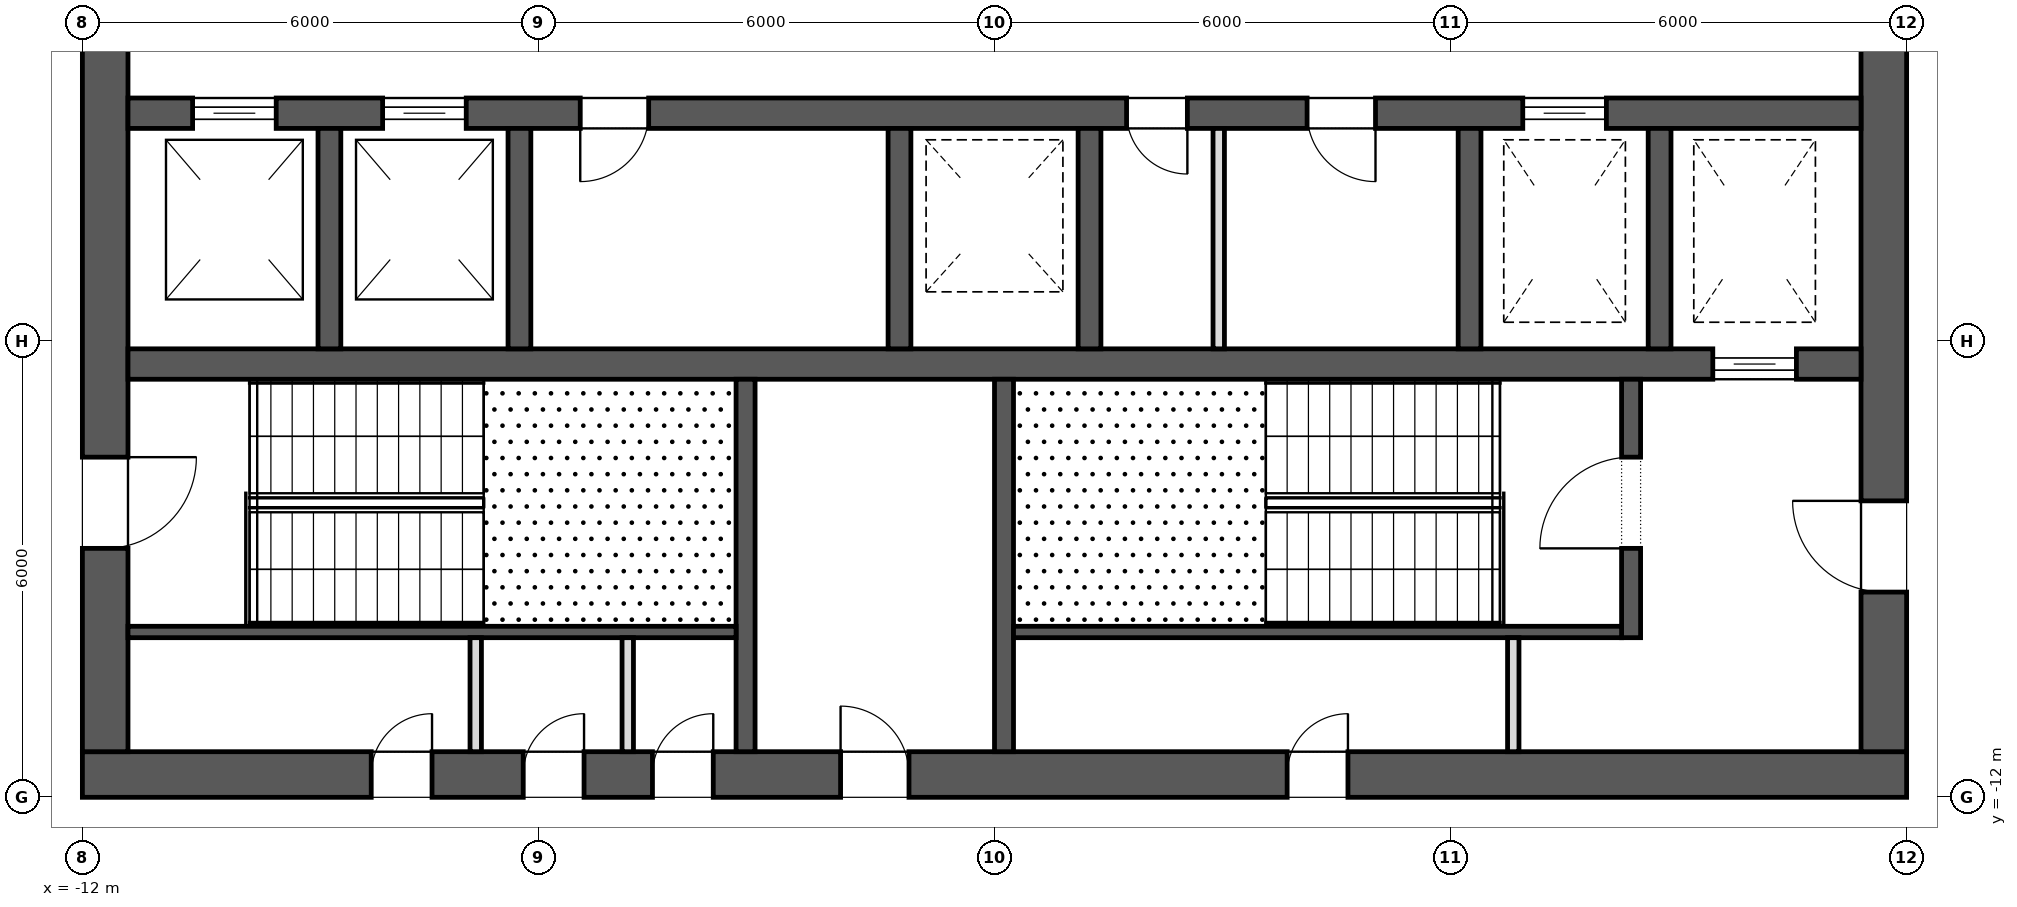
"""IFC4 building model, lengths in metres.
Left out: names, types, materials, properties, quantities, classifications, styles, units other than length and angle.
Written with IfcOpenShell. Run it as: python <this file> out.ifc"""

import sys

from ifc_helpers import new_model, si_unit, direction, frame, frame_2d, origin, place, context, subcontext, project, spatial, rectangle, extrude, element, fill, save


model = new_model("IFC4")
c1 = context("Model", 3, precision=1e-05, world=origin(), true_north=direction((0.0, 1.0)))
c2 = subcontext(c1, "Body", "Model", "MODEL_VIEW")
j1 = project(units=[si_unit("LENGTHUNIT", "METRE"), si_unit("PLANEANGLEUNIT", "RADIAN")], contexts=[c1])
p1 = place(None, origin())
s1 = spatial("IfcSite", under=j1, at=p1, CompositionType="ELEMENT")
p2 = place(p1, origin())
s2 = spatial("IfcBuilding", under=s1, at=p2, CompositionType="ELEMENT")
p3 = place(p2, frame((0.0, 0.0, 256.3)))
s3 = spatial("IfcBuildingStorey", under=s2, at=p3, CompositionType="ELEMENT", Elevation=256.3)
p4 = place(p3, frame((-12.0, -11.7, 0.0), z_axis=(0.0, 0.0, 1.0), x_axis=(1.0, 0.0, 0.0)))
e1 = element("IfcWall", 1, at=p4, inside=s3, PredefinedType="SHEAR", context=c2, shape_type="SweptSolid", body=[
    extrude(rectangle(XDim=24.0, YDim=0.6, at=frame_2d((12.0, 0.0))), origin(), (0.0, 0.0, 1.0), 4.0),
])
p5 = place(p4, frame((9.975, 0.0, 0.0)))
e2 = element("IfcOpeningElement", 2, at=p5, cuts=e1, PredefinedType="OPENING", context=c2, shape_type="SweptSolid", body=[
    extrude(rectangle(XDim=0.9, YDim=2.1, at=frame_2d((0.45, 1.05))), frame((0.0, 0.312, 0.0), z_axis=(0.0, -1.0, 0.0), x_axis=(1.0, 0.0, 0.0)), (0.0, 0.0, 1.0), 0.624),
])
p6 = place(p4, frame((3.8, 0.0, 0.0)))
e3 = element("IfcOpeningElement", 3, at=p6, cuts=e1, PredefinedType="OPENING", context=c2, shape_type="SweptSolid", body=[
    extrude(rectangle(XDim=0.8, YDim=2.1, at=frame_2d((0.4, 1.05))), frame((0.0, 0.312, 0.0), z_axis=(0.0, -1.0, 0.0), x_axis=(1.0, 0.0, 0.0)), (0.0, 0.0, 1.0), 0.624),
])
p7 = place(p4, frame((5.8, 0.0, 0.0)))
e4 = element("IfcOpeningElement", 4, at=p7, cuts=e1, PredefinedType="OPENING", context=c2, shape_type="SweptSolid", body=[
    extrude(rectangle(XDim=0.8, YDim=2.1, at=frame_2d((0.4, 1.05))), frame((0.0, 0.312, 0.0), z_axis=(0.0, -1.0, 0.0), x_axis=(1.0, 0.0, 0.0)), (0.0, 0.0, 1.0), 0.624),
])
p8 = place(p4, frame((7.5, 0.0, 0.0)))
e5 = element("IfcOpeningElement", 5, at=p8, cuts=e1, PredefinedType="OPENING", context=c2, shape_type="SweptSolid", body=[
    extrude(rectangle(XDim=0.8, YDim=2.1, at=frame_2d((0.4, 1.05))), frame((0.0, 0.312, 0.0), z_axis=(0.0, -1.0, 0.0), x_axis=(1.0, 0.0, 0.0)), (0.0, 0.0, 1.0), 0.624),
])
p9 = place(p4, frame((15.85, 0.0, 0.0)))
e6 = element("IfcOpeningElement", 6, at=p9, cuts=e1, PredefinedType="OPENING", context=c2, shape_type="SweptSolid", body=[
    extrude(rectangle(XDim=0.8, YDim=2.1, at=frame_2d((0.4, 1.05))), frame((0.0, 0.312, 0.0), z_axis=(0.0, -1.0, 0.0), x_axis=(1.0, 0.0, 0.0)), (0.0, 0.0, 1.0), 0.624),
])
p10 = place(p3, frame((11.7, -11.4, 0.0), z_axis=(0.0, 0.0, 1.0), x_axis=(0.0, 1.0, 0.0)))
e7 = element("IfcWall", 7, at=p10, inside=s3, PredefinedType="SHEAR", context=c2, shape_type="SweptSolid", body=[
    extrude(rectangle(XDim=22.8, YDim=0.6, at=frame_2d((11.4, 0.0))), origin(), (0.0, 0.0, 1.0), 4.0),
])
p11 = place(p10, frame((10.2, 0.0, 0.0)))
e8 = element("IfcOpeningElement", 8, at=p11, cuts=e7, PredefinedType="OPENING", context=c2, shape_type="SweptSolid", body=[
    extrude(rectangle(XDim=2.4, YDim=2.1, at=frame_2d((1.2, 1.05))), frame((0.0, 0.312, 0.0), z_axis=(0.0, -1.0, 0.0), x_axis=(1.0, 0.0, 0.0)), (0.0, 0.0, 1.0), 0.624),
])
p12 = place(p10, frame((19.5, 0.0, 0.0)))
e9 = element("IfcOpeningElement", 9, at=p12, cuts=e7, PredefinedType="OPENING", context=c2, shape_type="SweptSolid", body=[
    extrude(rectangle(XDim=1.2, YDim=2.1, at=frame_2d((0.6, 1.05))), frame((0.0, 0.312, 0.0), z_axis=(0.0, -1.0, 0.0), x_axis=(1.0, 0.0, 0.0)), (0.0, 0.0, 1.0), 0.624),
])
p13 = place(p10, frame((2.1, 0.0, 0.0)))
e10 = element("IfcOpeningElement", 10, at=p13, cuts=e7, PredefinedType="OPENING", context=c2, shape_type="SweptSolid", body=[
    extrude(rectangle(XDim=1.2, YDim=2.1, at=frame_2d((0.6, 1.05))), frame((0.0, 0.312, 0.0), z_axis=(0.0, -1.0, 0.0), x_axis=(1.0, 0.0, 0.0)), (0.0, 0.0, 1.0), 0.624),
])
p14 = place(p3, frame((-11.7, -11.4, 0.0), z_axis=(0.0, 0.0, 1.0), x_axis=(0.0, 1.0, 0.0)))
e11 = element("IfcWall", 11, at=p14, inside=s3, PredefinedType="SHEAR", context=c2, shape_type="SweptSolid", body=[
    extrude(rectangle(XDim=22.8, YDim=0.6, at=frame_2d((11.4, 0.0))), origin(), (0.0, 0.0, 1.0), 4.0),
])
p15 = place(p14, frame((10.2, 0.0, 0.0)))
e12 = element("IfcOpeningElement", 12, at=p15, cuts=e11, PredefinedType="OPENING", context=c2, shape_type="SweptSolid", body=[
    extrude(rectangle(XDim=2.4, YDim=2.1, at=frame_2d((1.2, 1.05))), frame((0.0, 0.312, 0.0), z_axis=(0.0, -1.0, 0.0), x_axis=(1.0, 0.0, 0.0)), (0.0, 0.0, 1.0), 0.624),
])
p16 = place(p14, frame((18.925, 0.0, 0.0)))
e13 = element("IfcOpeningElement", 13, at=p16, cuts=e11, PredefinedType="OPENING", context=c2, shape_type="SweptSolid", body=[
    extrude(rectangle(XDim=1.2, YDim=2.1, at=frame_2d((0.6, 1.05))), frame((0.0, 0.312, 0.0), z_axis=(0.0, -1.0, 0.0), x_axis=(1.0, 0.0, 0.0)), (0.0, 0.0, 1.0), 0.624),
])
p17 = place(p14, frame((2.675, 0.0, 0.0)))
e14 = element("IfcOpeningElement", 14, at=p17, cuts=e11, PredefinedType="OPENING", context=c2, shape_type="SweptSolid", body=[
    extrude(rectangle(XDim=1.2, YDim=2.1, at=frame_2d((0.6, 1.05))), frame((0.0, 0.312, 0.0), z_axis=(0.0, -1.0, 0.0), x_axis=(1.0, 0.0, 0.0)), (0.0, 0.0, 1.0), 0.624),
])
p18 = place(p3, frame((-11.4, -3.0, 0.0), z_axis=(0.0, 0.0, 1.0), x_axis=(1.0, 0.0, 0.0)))
e15 = element("IfcWall", 15, at=p18, inside=s3, PredefinedType="SHEAR", context=c2, shape_type="SweptSolid", body=[
    extrude(rectangle(XDim=22.8, YDim=0.4, at=frame_2d((11.4, 0.0))), origin(), (0.0, 0.0, 1.0), 4.0),
])
p19 = place(p18, frame((0.85, 0.0, 0.0)))
e16 = element("IfcOpeningElement", 16, at=p19, cuts=e15, PredefinedType="OPENING", context=c2, shape_type="SweptSolid", body=[
    extrude(rectangle(XDim=1.1, YDim=2.1, at=frame_2d((0.55, 1.05))), frame((0.0, 0.212, 0.0), z_axis=(0.0, -1.0, 0.0), x_axis=(1.0, 0.0, 0.0)), (0.0, 0.0, 1.0), 0.424),
])
p20 = place(p18, frame((3.35, 0.0, 0.0)))
e17 = element("IfcOpeningElement", 17, at=p20, cuts=e15, PredefinedType="OPENING", context=c2, shape_type="SweptSolid", body=[
    extrude(rectangle(XDim=1.1, YDim=2.1, at=frame_2d((0.55, 1.05))), frame((0.0, 0.212, 0.0), z_axis=(0.0, -1.0, 0.0), x_axis=(1.0, 0.0, 0.0)), (0.0, 0.0, 1.0), 0.424),
])
p21 = place(p18, frame((18.35, 0.0, 0.0)))
e18 = element("IfcOpeningElement", 18, at=p21, cuts=e15, PredefinedType="OPENING", context=c2, shape_type="SweptSolid", body=[
    extrude(rectangle(XDim=1.1, YDim=2.1, at=frame_2d((0.55, 1.05))), frame((0.0, 0.212, 0.0), z_axis=(0.0, -1.0, 0.0), x_axis=(1.0, 0.0, 0.0)), (0.0, 0.0, 1.0), 0.424),
])
p22 = place(p18, frame((13.137, 0.0, 0.0)))
e19 = element("IfcOpeningElement", 19, at=p22, cuts=e15, PredefinedType="OPENING", context=c2, shape_type="SweptSolid", body=[
    extrude(rectangle(XDim=0.8, YDim=2.1, at=frame_2d((0.4, 1.05))), frame((0.0, 0.212, 0.0), z_axis=(0.0, -1.0, 0.0), x_axis=(1.0, 0.0, 0.0)), (0.0, 0.0, 1.0), 0.424),
])
p23 = place(p18, frame((15.512, 0.0, 0.0)))
e20 = element("IfcOpeningElement", 20, at=p23, cuts=e15, PredefinedType="OPENING", context=c2, shape_type="SweptSolid", body=[
    extrude(rectangle(XDim=0.9, YDim=2.1, at=frame_2d((0.45, 1.05))), frame((0.0, 0.212, 0.0), z_axis=(0.0, -1.0, 0.0), x_axis=(1.0, 0.0, 0.0)), (0.0, 0.0, 1.0), 0.424),
])
p24 = place(p18, frame((5.95, 0.0, 0.0)))
e21 = element("IfcOpeningElement", 21, at=p24, cuts=e15, PredefinedType="OPENING", context=c2, shape_type="SweptSolid", body=[
    extrude(rectangle(XDim=0.9, YDim=2.1, at=frame_2d((0.45, 1.05))), frame((0.0, 0.212, 0.0), z_axis=(0.0, -1.0, 0.0), x_axis=(1.0, 0.0, 0.0)), (0.0, 0.0, 1.0), 0.424),
])
p25 = place(p3, frame((-11.4, -6.3, 0.0), z_axis=(0.0, 0.0, 1.0), x_axis=(1.0, 0.0, 0.0)))
e22 = element("IfcWall", 22, at=p25, inside=s3, PredefinedType="SHEAR", context=c2, shape_type="SweptSolid", body=[
    extrude(rectangle(XDim=22.8, YDim=0.4, at=frame_2d((11.4, 0.0))), origin(), (0.0, 0.0, 1.0), 4.0),
])
p26 = place(p25, frame((20.85, 0.0, 0.0)))
e23 = element("IfcOpeningElement", 23, at=p26, cuts=e22, PredefinedType="OPENING", context=c2, shape_type="SweptSolid", body=[
    extrude(rectangle(XDim=1.1, YDim=2.1, at=frame_2d((0.55, 1.05))), frame((0.0, 0.212, 0.0), z_axis=(0.0, -1.0, 0.0), x_axis=(1.0, 0.0, 0.0)), (0.0, 0.0, 1.0), 0.424),
])
for number, where, z_axis, x_axis in (
    (24, (-8.75, -6.1, 0.0), (0.0, 0.0, 1.0), (0.0, 1.0, 0.0)),
    (25, (-6.25, -6.1, 0.0), (0.0, 0.0, 1.0), (0.0, 1.0, 0.0)),
    (26, (-1.25, -6.1, 0.0), (0.0, 0.0, 1.0), (0.0, 1.0, 0.0)),
    (27, (1.25, -6.1, 0.0), (0.0, 0.0, 1.0), (0.0, 1.0, 0.0)),
    (28, (6.25, -6.1, 0.0), (0.0, 0.0, 1.0), (0.0, 1.0, 0.0)),
    (29, (8.75, -6.1, 0.0), (0.0, 0.0, 1.0), (0.0, 1.0, 0.0)),
):
    element("IfcWall", number, at=place(p3, frame(where, z_axis=z_axis, x_axis=x_axis)), inside=s3, PredefinedType="SHEAR", context=c2, shape_type="SweptSolid", body=[
        extrude(rectangle(XDim=2.9, YDim=0.3, at=frame_2d((1.45, 0.0))), origin(), (0.0, 0.0, 1.0), 4.0),
    ])
for number, where, z_axis, x_axis in (
    (30, (-3.275, -11.4, 0.0), (0.0, 0.0, 1.0), (0.0, 1.0, 0.0)),
    (31, (0.125, -11.4, 0.0), (0.0, 0.0, 1.0), (0.0, 1.0, 0.0)),
):
    element("IfcWall", number, at=place(p3, frame(where, z_axis=z_axis, x_axis=x_axis)), inside=s3, PredefinedType="SHEAR", context=c2, shape_type="SweptSolid", body=[
        extrude(rectangle(XDim=4.9, YDim=0.25, at=frame_2d((2.45, 0.0))), origin(), (0.0, 0.0, 1.0), 3.7),
    ])
p27 = place(p3, frame((8.375, -9.9, 0.0), z_axis=(0.0, 0.0, 1.0), x_axis=(0.0, 1.0, 0.0)))
e32 = element("IfcWall", 32, at=p27, inside=s3, PredefinedType="SHEAR", context=c2, shape_type="SweptSolid", body=[
    extrude(rectangle(XDim=3.4, YDim=0.25, at=frame_2d((1.7, 0.0))), origin(), (0.0, 0.0, 1.0), 3.7),
])
p28 = place(p27, frame((1.175, 0.0, 0.0)))
e33 = element("IfcOpeningElement", 33, at=p28, cuts=e32, PredefinedType="OPENING", context=c2, shape_type="SweptSolid", body=[
    extrude(rectangle(XDim=1.2, YDim=2.1, at=frame_2d((0.6, 1.05))), frame((0.0, 0.137, 0.0), z_axis=(0.0, -1.0, 0.0), x_axis=(1.0, 0.0, 0.0)), (0.0, 0.0, 1.0), 0.274),
])
for number, where, z_axis, x_axis in (
    (34, (-11.4, -9.825, 0.0), (0.0, 0.0, 1.0), (1.0, 0.0, 0.0)),
    (35, (0.25, -9.825, 0.0), (0.0, 0.0, 1.0), (1.0, 0.0, 0.0)),
):
    element("IfcWall", number, at=place(p3, frame(where, z_axis=z_axis, x_axis=x_axis)), inside=s3, PredefinedType="SHEAR", context=c2, shape_type="SweptSolid", body=[
        extrude(rectangle(XDim=8.0, YDim=0.15, at=frame_2d((4.0, 0.0))), origin(), (0.0, 0.0, 1.0), 3.7),
    ])
for number, where, z_axis, x_axis in (
    (36, (-6.825, -11.4, 0.0), (0.0, 0.0, 1.0), (0.0, 1.0, 0.0)),
    (37, (-4.825, -11.4, 0.0), (0.0, 0.0, 1.0), (0.0, 1.0, 0.0)),
    (38, (6.825, -11.4, 0.0), (0.0, 0.0, 1.0), (0.0, 1.0, 0.0)),
):
    element("IfcWall", number, at=place(p3, frame(where, z_axis=z_axis, x_axis=x_axis)), inside=s3, PredefinedType="PARTITIONING", context=c2, shape_type="SweptSolid", body=[
        extrude(rectangle(XDim=1.5, YDim=0.15, at=frame_2d((0.75, 0.0))), origin(), (0.0, 0.0, 1.0), 3.7),
    ])
p29 = place(p3, frame((2.95, -6.1, 0.0), z_axis=(0.0, 0.0, 1.0), x_axis=(0.0, 1.0, 0.0)))
e39 = element("IfcWall", 39, at=p29, inside=s3, PredefinedType="PARTITIONING", context=c2, shape_type="SweptSolid", body=[
    extrude(rectangle(XDim=2.9, YDim=0.15, at=frame_2d((1.45, 0.0))), origin(), (0.0, 0.0, 1.0), 3.7),
])
p30 = place(p26, origin())
e40 = element("IfcDoor", 40, at=p30, inside=s3, OperationType="SLIDING_TO_LEFT", PredefinedType="DOOR", context=c2, shape_type="SweptSolid", body=[
    extrude(rectangle(XDim=1.1, YDim=2.1, at=frame_2d((0.55, 1.05))), frame((0.0, 0.025, 0.0), z_axis=(0.0, -1.0, 0.0), x_axis=(1.0, 0.0, 0.0)), (0.0, 0.0, 1.0), 0.05),
])
fill(e23, e40)
p31 = place(p19, origin())
e41 = element("IfcDoor", 41, at=p31, inside=s3, OperationType="SLIDING_TO_LEFT", PredefinedType="DOOR", context=c2, shape_type="SweptSolid", body=[
    extrude(rectangle(XDim=1.1, YDim=2.1, at=frame_2d((0.55, 1.05))), frame((0.0, 0.025, 0.0), z_axis=(0.0, -1.0, 0.0), x_axis=(1.0, 0.0, 0.0)), (0.0, 0.0, 1.0), 0.05),
])
fill(e16, e41)
p32 = place(p20, origin())
e42 = element("IfcDoor", 42, at=p32, inside=s3, OperationType="SLIDING_TO_LEFT", PredefinedType="DOOR", context=c2, shape_type="SweptSolid", body=[
    extrude(rectangle(XDim=1.1, YDim=2.1, at=frame_2d((0.55, 1.05))), frame((0.0, 0.025, 0.0), z_axis=(0.0, -1.0, 0.0), x_axis=(1.0, 0.0, 0.0)), (0.0, 0.0, 1.0), 0.05),
])
fill(e17, e42)
p33 = place(p21, origin())
e43 = element("IfcDoor", 43, at=p33, inside=s3, OperationType="SLIDING_TO_LEFT", PredefinedType="DOOR", context=c2, shape_type="SweptSolid", body=[
    extrude(rectangle(XDim=1.1, YDim=2.1, at=frame_2d((0.55, 1.05))), frame((0.0, 0.025, 0.0), z_axis=(0.0, -1.0, 0.0), x_axis=(1.0, 0.0, 0.0)), (0.0, 0.0, 1.0), 0.05),
])
fill(e18, e43)
p34 = place(p17, frame((1.2, 0.0, 0.0), z_axis=(0.0, 0.0, 1.0), x_axis=(-1.0, 0.0, 0.0)))
e44 = element("IfcDoor", 44, at=p34, inside=s3, OperationType="SINGLE_SWING_RIGHT", PredefinedType="DOOR", context=c2, shape_type="SweptSolid", body=[
    extrude(rectangle(XDim=1.2, YDim=2.1, at=frame_2d((0.6, 1.05))), frame((0.0, 0.025, 0.0), z_axis=(0.0, -1.0, 0.0), x_axis=(1.0, 0.0, 0.0)), (0.0, 0.0, 1.0), 0.05),
])
fill(e14, e44)
p35 = place(p28, origin())
e45 = element("IfcDoor", 45, at=p35, inside=s3, OperationType="SINGLE_SWING_RIGHT", PredefinedType="DOOR", context=c2, shape_type="SweptSolid", body=[
    extrude(rectangle(XDim=1.2, YDim=2.1, at=frame_2d((0.6, 1.05))), frame((0.0, 0.025, 0.0), z_axis=(0.0, -1.0, 0.0), x_axis=(1.0, 0.0, 0.0)), (0.0, 0.0, 1.0), 0.05),
])
fill(e33, e45)
p36 = place(p13, origin())
e46 = element("IfcDoor", 46, at=p36, inside=s3, OperationType="SINGLE_SWING_LEFT", PredefinedType="DOOR", context=c2, shape_type="SweptSolid", body=[
    extrude(rectangle(XDim=1.2, YDim=2.1, at=frame_2d((0.6, 1.05))), frame((0.0, 0.025, 0.0), z_axis=(0.0, -1.0, 0.0), x_axis=(1.0, 0.0, 0.0)), (0.0, 0.0, 1.0), 0.05),
])
fill(e10, e46)
p37 = place(p5, origin())
e47 = element("IfcDoor", 47, at=p37, inside=s3, OperationType="SINGLE_SWING_RIGHT", PredefinedType="DOOR", context=c2, shape_type="SweptSolid", body=[
    extrude(rectangle(XDim=0.9, YDim=2.1, at=frame_2d((0.45, 1.05))), frame((0.0, 0.025, 0.0), z_axis=(0.0, -1.0, 0.0), x_axis=(1.0, 0.0, 0.0)), (0.0, 0.0, 1.0), 0.05),
])
fill(e2, e47)
p38 = place(p6, origin())
e48 = element("IfcDoor", 48, at=p38, inside=s3, OperationType="SINGLE_SWING_LEFT", PredefinedType="DOOR", context=c2, shape_type="SweptSolid", body=[
    extrude(rectangle(XDim=0.8, YDim=2.1, at=frame_2d((0.4, 1.05))), frame((0.0, 0.025, 0.0), z_axis=(0.0, -1.0, 0.0), x_axis=(1.0, 0.0, 0.0)), (0.0, 0.0, 1.0), 0.05),
])
fill(e3, e48)
p39 = place(p7, origin())
e49 = element("IfcDoor", 49, at=p39, inside=s3, OperationType="SINGLE_SWING_LEFT", PredefinedType="DOOR", context=c2, shape_type="SweptSolid", body=[
    extrude(rectangle(XDim=0.8, YDim=2.1, at=frame_2d((0.4, 1.05))), frame((0.0, 0.025, 0.0), z_axis=(0.0, -1.0, 0.0), x_axis=(1.0, 0.0, 0.0)), (0.0, 0.0, 1.0), 0.05),
])
fill(e4, e49)
p40 = place(p8, origin())
e50 = element("IfcDoor", 50, at=p40, inside=s3, OperationType="SINGLE_SWING_LEFT", PredefinedType="DOOR", context=c2, shape_type="SweptSolid", body=[
    extrude(rectangle(XDim=0.8, YDim=2.1, at=frame_2d((0.4, 1.05))), frame((0.0, 0.025, 0.0), z_axis=(0.0, -1.0, 0.0), x_axis=(1.0, 0.0, 0.0)), (0.0, 0.0, 1.0), 0.05),
])
fill(e5, e50)
p41 = place(p9, origin())
e51 = element("IfcDoor", 51, at=p41, inside=s3, OperationType="SINGLE_SWING_LEFT", PredefinedType="DOOR", context=c2, shape_type="SweptSolid", body=[
    extrude(rectangle(XDim=0.8, YDim=2.1, at=frame_2d((0.4, 1.05))), frame((0.0, 0.025, 0.0), z_axis=(0.0, -1.0, 0.0), x_axis=(1.0, 0.0, 0.0)), (0.0, 0.0, 1.0), 0.05),
])
fill(e6, e51)
p42 = place(p22, frame((0.8, 0.0, 0.0), z_axis=(0.0, 0.0, 1.0), x_axis=(-1.0, 0.0, 0.0)))
e52 = element("IfcDoor", 52, at=p42, inside=s3, OperationType="SINGLE_SWING_RIGHT", PredefinedType="DOOR", context=c2, shape_type="SweptSolid", body=[
    extrude(rectangle(XDim=0.8, YDim=2.1, at=frame_2d((0.4, 1.05))), frame((0.0, 0.025, 0.0), z_axis=(0.0, -1.0, 0.0), x_axis=(1.0, 0.0, 0.0)), (0.0, 0.0, 1.0), 0.05),
])
fill(e19, e52)
p43 = place(p23, frame((0.9, 0.0, 0.0), z_axis=(0.0, 0.0, 1.0), x_axis=(-1.0, 0.0, 0.0)))
e53 = element("IfcDoor", 53, at=p43, inside=s3, OperationType="SINGLE_SWING_RIGHT", PredefinedType="DOOR", context=c2, shape_type="SweptSolid", body=[
    extrude(rectangle(XDim=0.9, YDim=2.1, at=frame_2d((0.45, 1.05))), frame((0.0, 0.025, 0.0), z_axis=(0.0, -1.0, 0.0), x_axis=(1.0, 0.0, 0.0)), (0.0, 0.0, 1.0), 0.05),
])
fill(e20, e53)
p44 = place(p24, frame((0.9, 0.0, 0.0), z_axis=(0.0, 0.0, 1.0), x_axis=(-1.0, 0.0, 0.0)))
e54 = element("IfcDoor", 54, at=p44, inside=s3, OperationType="SINGLE_SWING_LEFT", PredefinedType="DOOR", context=c2, shape_type="SweptSolid", body=[
    extrude(rectangle(XDim=0.9, YDim=2.1, at=frame_2d((0.45, 1.05))), frame((0.0, 0.025, 0.0), z_axis=(0.0, -1.0, 0.0), x_axis=(1.0, 0.0, 0.0)), (0.0, 0.0, 1.0), 0.05),
])
fill(e21, e54)
save(model, sys.argv[1])
